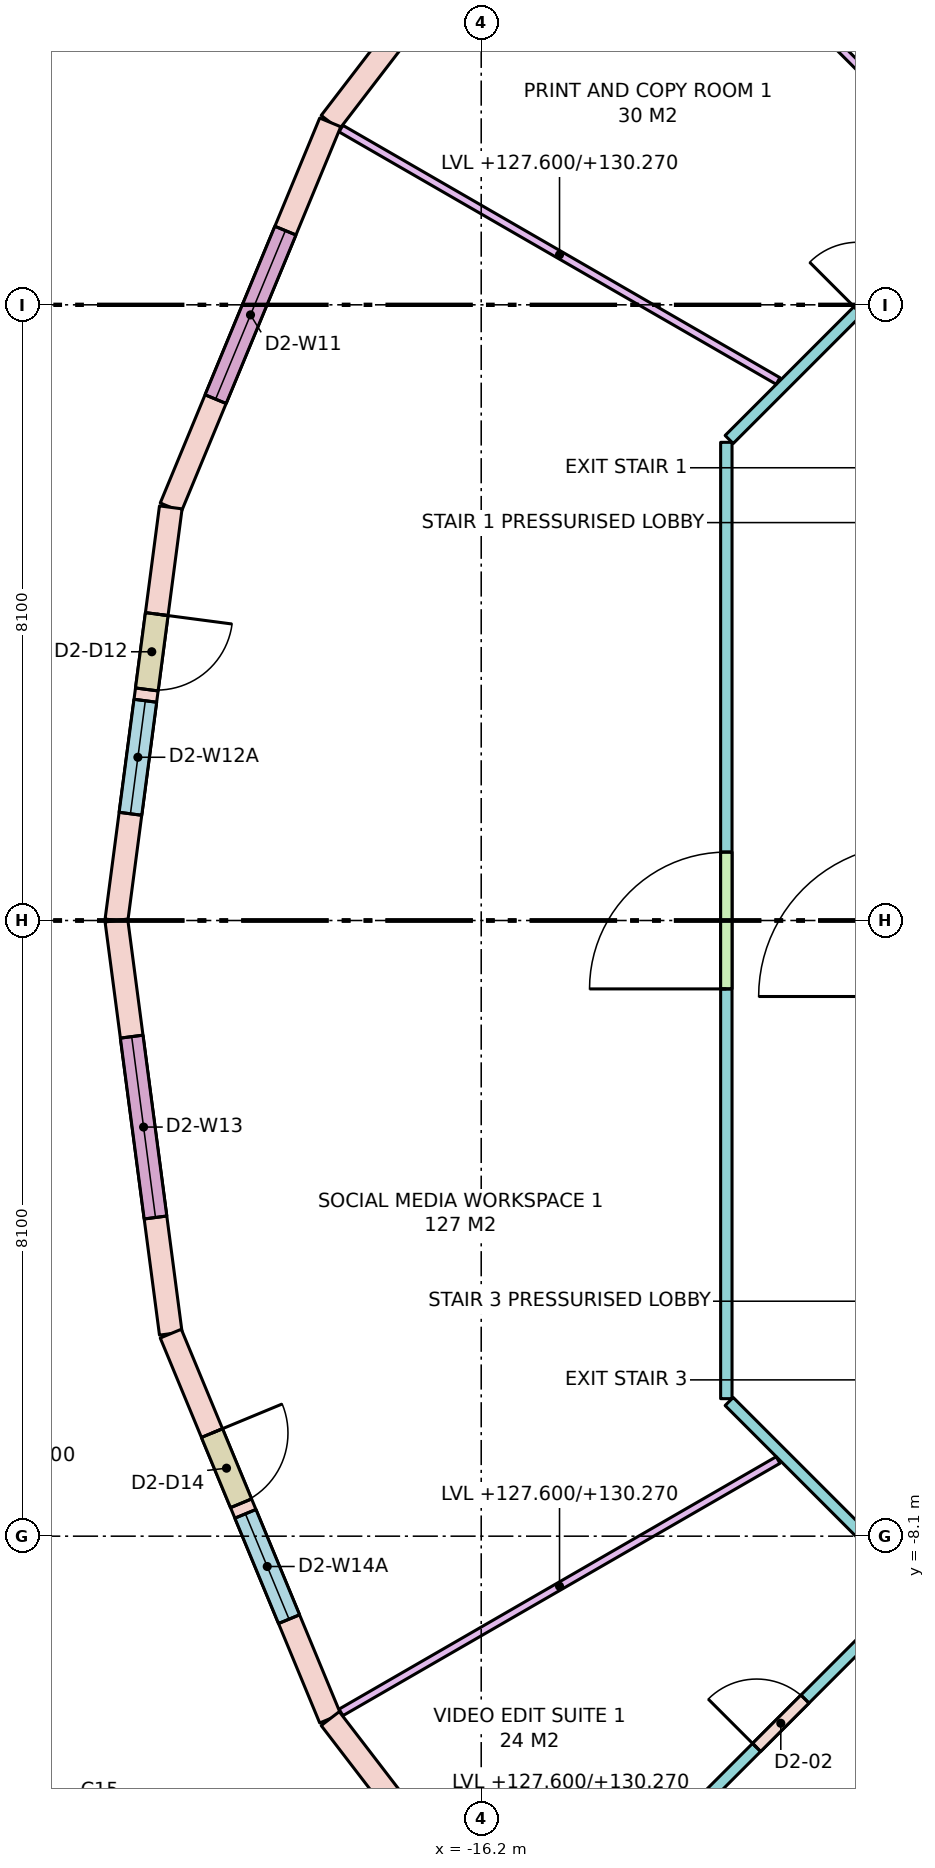
"""IFC4 building model, lengths in metres.
Left out: names, types, materials, properties, quantities, classifications, styles, units other than length and angle.
Written with IfcOpenShell. Run it as: python <this file> out.ifc"""

import sys

from ifc_helpers import new_model, si_unit, direction, frame, frame_2d, origin, place, context, subcontext, project, spatial, rectangle, extrude, element, fill, save


model = new_model("IFC4")
c1 = context("Model", 3, precision=1e-05, world=origin(), true_north=direction((0.0, 1.0)))
c2 = subcontext(c1, "Body", "Model", "MODEL_VIEW")
j1 = project(units=[si_unit("LENGTHUNIT", "METRE"), si_unit("PLANEANGLEUNIT", "RADIAN")], contexts=[c1])
p1 = place(None, origin())
s1 = spatial("IfcSite", under=j1, at=p1, CompositionType="ELEMENT")
p2 = place(p1, origin())
s2 = spatial("IfcBuilding", under=s1, at=p2, CompositionType="ELEMENT")
p3 = place(p2, frame((0.0, 0.0, 127.6)))
s3 = spatial("IfcBuildingStorey", under=s2, at=p3, CompositionType="ELEMENT", Elevation=127.6)
p4 = place(p3, frame((-14.849, 14.849, 0.0), z_axis=(0.0, 0.0, 1.0), x_axis=(-0.608784891166, -0.793335336593, 0.0)))
e1 = element("IfcWall", 1, at=p4, inside=s3, PredefinedType="STANDARD", context=c2, shape_type="SweptSolid", body=[
    extrude(rectangle(XDim=5.482, YDim=0.3, at=frame_2d((2.741, 0.0))), origin(), (0.0, 0.0, 1.0), 3.52),
])
p5 = place(p4, frame((1.416, 0.0, 0.0)))
e2 = element("IfcOpeningElement", 2, at=p5, cuts=e1, PredefinedType="OPENING", context=c2, shape_type="SweptSolid", body=[
    extrude(rectangle(XDim=1.0, YDim=2.4, at=frame_2d((0.5, 1.2))), frame((0.0, 0.16, 0.0), z_axis=(0.0, -1.0, 0.0), x_axis=(1.0, 0.0, 0.0)), (0.0, 0.0, 1.0), 0.32),
])
p6 = place(p4, frame((2.566, 0.0, 0.8)))
e3 = element("IfcOpeningElement", 3, at=p6, cuts=e1, PredefinedType="OPENING", context=c2, shape_type="SweptSolid", body=[
    extrude(rectangle(XDim=1.5, YDim=2.5, at=frame_2d((0.75, 1.25))), frame((0.0, 0.16, 0.0), z_axis=(0.0, -1.0, 0.0), x_axis=(1.0, 0.0, 0.0)), (0.0, 0.0, 1.0), 0.32),
])
p7 = place(p3, frame((-18.187, 10.5, 0.0), z_axis=(0.0, 0.0, 1.0), x_axis=(-0.382688740813, -0.923877333662, 0.0)))
e4 = element("IfcWall", 4, at=p7, inside=s3, PredefinedType="STANDARD", context=c2, shape_type="SweptSolid", body=[
    extrude(rectangle(XDim=5.482, YDim=0.3, at=frame_2d((2.741, 0.0))), origin(), (0.0, 0.0, 1.0), 3.52),
])
p8 = place(p7, frame((1.541, 0.0, 0.8)))
e5 = element("IfcOpeningElement", 5, at=p8, cuts=e4, PredefinedType="OPENING", context=c2, shape_type="SweptSolid", body=[
    extrude(rectangle(XDim=2.4, YDim=2.5, at=frame_2d((1.2, 1.25))), frame((0.0, 0.16, 0.0), z_axis=(0.0, -1.0, 0.0), x_axis=(1.0, 0.0, 0.0)), (0.0, 0.0, 1.0), 0.32),
])
p9 = place(p3, frame((-20.284, 5.435, 0.0), z_axis=(0.0, 0.0, 1.0), x_axis=(-0.130527087244, -0.991444743541, 0.0)))
e6 = element("IfcWall", 6, at=p9, inside=s3, PredefinedType="STANDARD", context=c2, shape_type="SweptSolid", body=[
    extrude(rectangle(XDim=5.482, YDim=0.3, at=frame_2d((2.741, 0.0))), origin(), (0.0, 0.0, 1.0), 3.52),
])
p10 = place(p9, frame((1.416, 0.0, 0.0)))
e7 = element("IfcOpeningElement", 7, at=p10, cuts=e6, PredefinedType="OPENING", context=c2, shape_type="SweptSolid", body=[
    extrude(rectangle(XDim=1.0, YDim=2.4, at=frame_2d((0.5, 1.2))), frame((0.0, 0.16, 0.0), z_axis=(0.0, -1.0, 0.0), x_axis=(1.0, 0.0, 0.0)), (0.0, 0.0, 1.0), 0.32),
])
p11 = place(p9, frame((2.566, 0.0, 0.8)))
e8 = element("IfcOpeningElement", 8, at=p11, cuts=e6, PredefinedType="OPENING", context=c2, shape_type="SweptSolid", body=[
    extrude(rectangle(XDim=1.5, YDim=2.5, at=frame_2d((0.75, 1.25))), frame((0.0, 0.16, 0.0), z_axis=(0.0, -1.0, 0.0), x_axis=(1.0, 0.0, 0.0)), (0.0, 0.0, 1.0), 0.32),
])
p12 = place(p3, frame((-21.0, 0.0, 0.0), z_axis=(0.0, 0.0, 1.0), x_axis=(0.130527087244, -0.991444743541, 0.0)))
e9 = element("IfcWall", 9, at=p12, inside=s3, PredefinedType="STANDARD", context=c2, shape_type="SweptSolid", body=[
    extrude(rectangle(XDim=5.482, YDim=0.3, at=frame_2d((2.741, 0.0))), origin(), (0.0, 0.0, 1.0), 3.52),
])
p13 = place(p12, frame((1.541, 0.0, 0.8)))
e10 = element("IfcOpeningElement", 10, at=p13, cuts=e9, PredefinedType="OPENING", context=c2, shape_type="SweptSolid", body=[
    extrude(rectangle(XDim=2.4, YDim=2.5, at=frame_2d((1.2, 1.25))), frame((0.0, 0.16, 0.0), z_axis=(0.0, -1.0, 0.0), x_axis=(1.0, 0.0, 0.0)), (0.0, 0.0, 1.0), 0.32),
])
p14 = place(p3, frame((-20.284, -5.435, 0.0), z_axis=(0.0, 0.0, 1.0), x_axis=(0.382688740813, -0.923877333662, 0.0)))
e11 = element("IfcWall", 11, at=p14, inside=s3, PredefinedType="STANDARD", context=c2, shape_type="SweptSolid", body=[
    extrude(rectangle(XDim=5.482, YDim=0.3, at=frame_2d((2.741, 0.0))), origin(), (0.0, 0.0, 1.0), 3.52),
])
p15 = place(p14, frame((1.416, 0.0, 0.0)))
e12 = element("IfcOpeningElement", 12, at=p15, cuts=e11, PredefinedType="OPENING", context=c2, shape_type="SweptSolid", body=[
    extrude(rectangle(XDim=1.0, YDim=2.4, at=frame_2d((0.5, 1.2))), frame((0.0, 0.16, 0.0), z_axis=(0.0, -1.0, 0.0), x_axis=(1.0, 0.0, 0.0)), (0.0, 0.0, 1.0), 0.32),
])
p16 = place(p14, frame((2.566, 0.0, 0.8)))
e13 = element("IfcOpeningElement", 13, at=p16, cuts=e11, PredefinedType="OPENING", context=c2, shape_type="SweptSolid", body=[
    extrude(rectangle(XDim=1.5, YDim=2.5, at=frame_2d((0.75, 1.25))), frame((0.0, 0.16, 0.0), z_axis=(0.0, -1.0, 0.0), x_axis=(1.0, 0.0, 0.0)), (0.0, 0.0, 1.0), 0.32),
])
p17 = place(p3, frame((-18.187, -10.5, 0.0), z_axis=(0.0, 0.0, 1.0), x_axis=(0.608784891166, -0.793335336593, 0.0)))
e14 = element("IfcWall", 14, at=p17, inside=s3, PredefinedType="STANDARD", context=c2, shape_type="SweptSolid", body=[
    extrude(rectangle(XDim=5.482, YDim=0.3, at=frame_2d((2.741, 0.0))), origin(), (0.0, 0.0, 1.0), 3.52),
])
p18 = place(p17, frame((1.541, 0.0, 0.8)))
e15 = element("IfcOpeningElement", 15, at=p18, cuts=e14, PredefinedType="OPENING", context=c2, shape_type="SweptSolid", body=[
    extrude(rectangle(XDim=2.4, YDim=2.5, at=frame_2d((1.2, 1.25))), frame((0.0, 0.16, 0.0), z_axis=(0.0, -1.0, 0.0), x_axis=(1.0, 0.0, 0.0)), (0.0, 0.0, 1.0), 0.32),
])
p19 = place(p3, frame((-14.035, -12.338, 0.0), z_axis=(0.0, 0.0, 1.0), x_axis=(0.707106781187, 0.707106781187, 0.0)))
e16 = element("IfcWall", 16, at=p19, inside=s3, PredefinedType="PARTITIONING", context=c2, shape_type="SweptSolid", body=[
    extrude(rectangle(XDim=5.026, YDim=0.15, at=frame_2d((2.513, 0.0))), origin(), (0.0, 0.0, 1.0), 3.52),
])
p20 = place(p19, frame((2.063, 0.0, 0.0)))
e17 = element("IfcOpeningElement", 17, at=p20, cuts=e16, PredefinedType="OPENING", context=c2, shape_type="SweptSolid", body=[
    extrude(rectangle(XDim=0.9, YDim=2.1, at=frame_2d((0.45, 1.05))), frame((0.0, 0.085, 0.0), z_axis=(0.0, -1.0, 0.0), x_axis=(1.0, 0.0, 0.0)), (0.0, 0.0, 1.0), 0.17),
])
p21 = place(p3, frame((-10.534, -8.731, 0.0), z_axis=(0.0, 0.0, 1.0), x_axis=(-0.707106781187, 0.707106781187, 0.0)))
e18 = element("IfcWall", 18, at=p21, inside=s3, PredefinedType="PARTITIONING", context=c2, shape_type="SweptSolid", body=[
    extrude(rectangle(XDim=3.399, YDim=0.15, at=frame_2d((1.7, 0.0))), origin(), (0.0, 0.0, 1.0), 2.67),
])
p22 = place(p3, frame((-12.975, -6.291, 0.0), z_axis=(0.0, 0.0, 1.0), x_axis=(0.0, 1.0, 0.0)))
e19 = element("IfcWall", 19, at=p22, inside=s3, PredefinedType="PARTITIONING", context=c2, shape_type="SweptSolid", body=[
    extrude(rectangle(XDim=12.582, YDim=0.15, at=frame_2d((6.291, 0.0))), origin(), (0.0, 0.0, 1.0), 2.67),
])
p23 = place(p22, frame((5.391, 0.0, 0.0)))
e20 = element("IfcOpeningElement", 20, at=p23, cuts=e19, PredefinedType="OPENING", context=c2, shape_type="SweptSolid", body=[
    extrude(rectangle(XDim=1.8, YDim=2.1, at=frame_2d((0.9, 1.05))), frame((0.0, 0.085, 0.0), z_axis=(0.0, -1.0, 0.0), x_axis=(1.0, 0.0, 0.0)), (0.0, 0.0, 1.0), 0.17),
])
p24 = place(p3, frame((-12.938, 6.328, 0.0), z_axis=(0.0, 0.0, 1.0), x_axis=(0.707088206597, 0.707125355289, 0.0)))
e21 = element("IfcWall", 21, at=p24, inside=s3, PredefinedType="PARTITIONING", context=c2, shape_type="SweptSolid", body=[
    extrude(rectangle(XDim=6.572, YDim=0.15, at=frame_2d((3.286, 0.0))), origin(), (0.0, 0.0, 1.0), 2.67),
])
p25 = place(p24, frame((2.398, 0.0, 0.0)))
e22 = element("IfcOpeningElement", 22, at=p25, cuts=e21, PredefinedType="OPENING", context=c2, shape_type="SweptSolid", body=[
    extrude(rectangle(XDim=0.9, YDim=2.1, at=frame_2d((0.45, 1.05))), frame((0.0, 0.085, 0.0), z_axis=(0.0, -1.0, 0.0), x_axis=(1.0, 0.0, 0.0)), (0.0, 0.0, 1.0), 0.17),
])
p26 = place(p3, frame((-8.784, -10.481, 0.0), z_axis=(0.0, 0.0, 1.0), x_axis=(-0.707106781187, -0.707106781187, 0.0)))
e23 = element("IfcWall", 23, at=p26, inside=s3, PredefinedType="PARTITIONING", context=c2, shape_type="SweptSolid", body=[
    extrude(rectangle(XDim=5.026, YDim=0.15, at=frame_2d((2.513, 0.0))), origin(), (0.0, 0.0, 1.0), 3.52),
])
p27 = place(p26, frame((2.063, 0.0, 0.0)))
e24 = element("IfcOpeningElement", 24, at=p27, cuts=e23, PredefinedType="OPENING", context=c2, shape_type="SweptSolid", body=[
    extrude(rectangle(XDim=0.9, YDim=2.1, at=frame_2d((0.45, 1.05))), frame((0.0, 0.085, 0.0), z_axis=(0.0, -1.0, 0.0), x_axis=(1.0, 0.0, 0.0)), (0.0, 0.0, 1.0), 0.17),
])
p28 = place(p3, frame((-9.686, 9.686, 0.0), z_axis=(0.0, 0.0, 1.0), x_axis=(-0.707106781187, 0.707106781187, 0.0)))
e25 = element("IfcWall", 25, at=p28, inside=s3, PredefinedType="PARTITIONING", context=c2, shape_type="SweptSolid", body=[
    extrude(rectangle(XDim=7.139, YDim=0.1, at=frame_2d((3.569, 0.0))), origin(), (0.0, 0.0, 1.0), 2.67),
])
for number, where, z_axis, x_axis in (
    (26, (-12.294, 7.098, 0.0), (0.0, 0.0, 1.0), (-0.866, 0.5, 0.0)),
    (27, (-12.294, -7.098, 0.0), (0.0, 0.0, 1.0), (-0.866, -0.5, 0.0)),
):
    element("IfcWall", number, at=place(p3, frame(where, z_axis=z_axis, x_axis=x_axis)), inside=s3, PredefinedType="PARTITIONING", context=c2, shape_type="SweptSolid", body=[
        extrude(rectangle(XDim=6.641, YDim=0.1, at=frame_2d((3.32, 0.0))), origin(), (0.0, 0.0, 1.0), 2.67),
    ])
p29 = place(p8, origin())
e28 = element("IfcWindow", 28, at=p29, inside=s3, PartitioningType="SINGLE_PANEL", PredefinedType="WINDOW", context=c2, shape_type="SweptSolid", body=[
    extrude(rectangle(XDim=2.4, YDim=2.5, at=frame_2d((1.2, 1.25))), frame((0.0, 0.03, 0.0), z_axis=(0.0, -1.0, 0.0), x_axis=(1.0, 0.0, 0.0)), (0.0, 0.0, 1.0), 0.06),
])
fill(e5, e28)
p30 = place(p10, origin())
e29 = element("IfcDoor", 29, at=p30, inside=s3, OperationType="SINGLE_SWING_LEFT", PredefinedType="DOOR", context=c2, shape_type="SweptSolid", body=[
    extrude(rectangle(XDim=1.0, YDim=2.4, at=frame_2d((0.5, 1.2))), frame((0.0, 0.025, 0.0), z_axis=(0.0, -1.0, 0.0), x_axis=(1.0, 0.0, 0.0)), (0.0, 0.0, 1.0), 0.05),
])
fill(e7, e29)
p31 = place(p11, origin())
e30 = element("IfcWindow", 30, at=p31, inside=s3, PartitioningType="SINGLE_PANEL", PredefinedType="WINDOW", context=c2, shape_type="SweptSolid", body=[
    extrude(rectangle(XDim=1.5, YDim=2.5, at=frame_2d((0.75, 1.25))), frame((0.0, 0.03, 0.0), z_axis=(0.0, -1.0, 0.0), x_axis=(1.0, 0.0, 0.0)), (0.0, 0.0, 1.0), 0.06),
])
fill(e8, e30)
p32 = place(p13, origin())
e31 = element("IfcWindow", 31, at=p32, inside=s3, PartitioningType="SINGLE_PANEL", PredefinedType="WINDOW", context=c2, shape_type="SweptSolid", body=[
    extrude(rectangle(XDim=2.4, YDim=2.5, at=frame_2d((1.2, 1.25))), frame((0.0, 0.03, 0.0), z_axis=(0.0, -1.0, 0.0), x_axis=(1.0, 0.0, 0.0)), (0.0, 0.0, 1.0), 0.06),
])
fill(e10, e31)
p33 = place(p15, origin())
e32 = element("IfcDoor", 32, at=p33, inside=s3, OperationType="SINGLE_SWING_LEFT", PredefinedType="DOOR", context=c2, shape_type="SweptSolid", body=[
    extrude(rectangle(XDim=1.0, YDim=2.4, at=frame_2d((0.5, 1.2))), frame((0.0, 0.025, 0.0), z_axis=(0.0, -1.0, 0.0), x_axis=(1.0, 0.0, 0.0)), (0.0, 0.0, 1.0), 0.05),
])
fill(e12, e32)
p34 = place(p16, origin())
e33 = element("IfcWindow", 33, at=p34, inside=s3, PartitioningType="SINGLE_PANEL", PredefinedType="WINDOW", context=c2, shape_type="SweptSolid", body=[
    extrude(rectangle(XDim=1.5, YDim=2.5, at=frame_2d((0.75, 1.25))), frame((0.0, 0.03, 0.0), z_axis=(0.0, -1.0, 0.0), x_axis=(1.0, 0.0, 0.0)), (0.0, 0.0, 1.0), 0.06),
])
fill(e13, e33)
p35 = place(p23, origin())
e34 = element("IfcDoor", 34, at=p35, inside=s3, OperationType="DOUBLE_DOOR_SINGLE_SWING", PredefinedType="DOOR", context=c2, shape_type="SweptSolid", body=[
    extrude(rectangle(XDim=1.8, YDim=2.1, at=frame_2d((0.9, 1.05))), frame((0.0, 0.025, 0.0), z_axis=(0.0, -1.0, 0.0), x_axis=(1.0, 0.0, 0.0)), (0.0, 0.0, 1.0), 0.05),
])
fill(e20, e34)
p36 = place(p20, origin())
e35 = element("IfcDoor", 35, at=p36, inside=s3, OperationType="SINGLE_SWING_LEFT", PredefinedType="DOOR", context=c2, shape_type="SweptSolid", body=[
    extrude(rectangle(XDim=0.9, YDim=2.1, at=frame_2d((0.45, 1.05))), frame((0.0, 0.025, 0.0), z_axis=(0.0, -1.0, 0.0), x_axis=(1.0, 0.0, 0.0)), (0.0, 0.0, 1.0), 0.05),
])
fill(e17, e35)
save(model, sys.argv[1])
